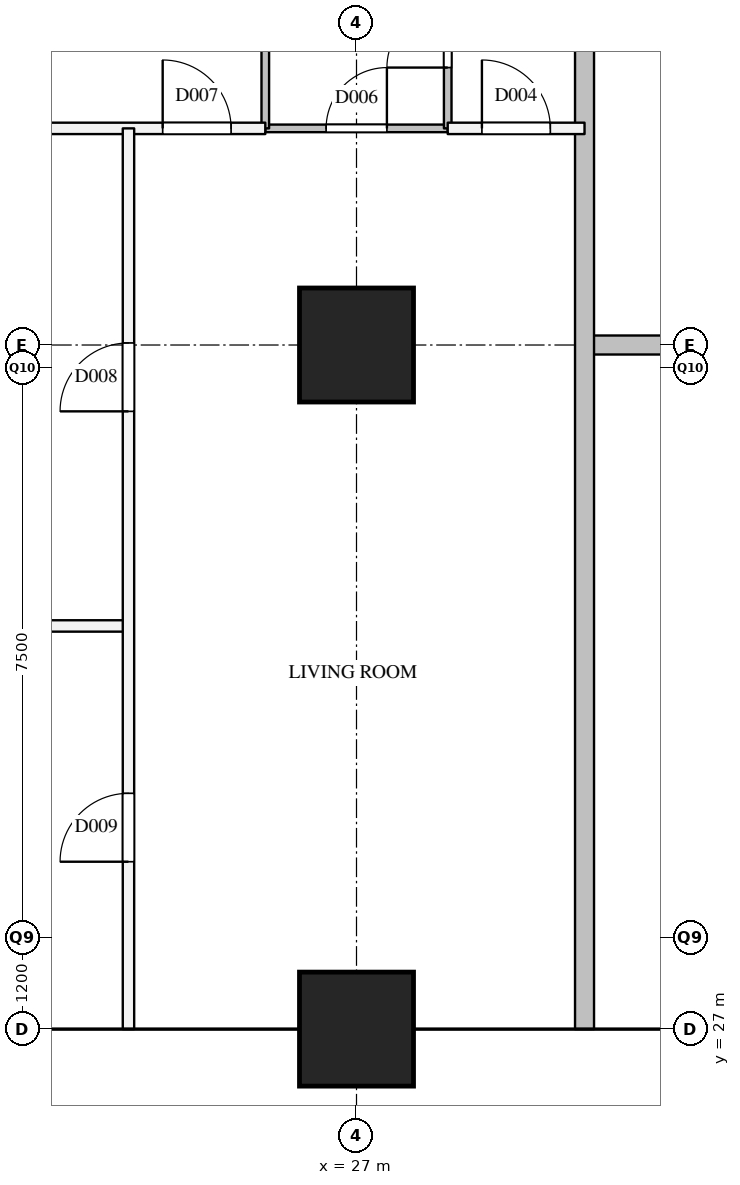
"""IFC4 building model, lengths in metres.
Left out: names, types, materials, properties, quantities, classifications, styles, units other than length and angle.
Written with IfcOpenShell. Run it as: python <this file> out.ifc"""

import sys

from ifc_helpers import new_model, si_unit, direction, frame, frame_2d, origin, origin_2d, place, context, subcontext, project, spatial, rectangle, extrude, element, fill, save


model = new_model("IFC4")
c1 = context("Model", 3, precision=1e-05, world=origin(), true_north=direction((0.0, 1.0)))
c2 = subcontext(c1, "Body", "Model", "MODEL_VIEW")
j1 = project(units=[si_unit("LENGTHUNIT", "METRE"), si_unit("PLANEANGLEUNIT", "RADIAN")], contexts=[c1])
p1 = place(None, origin())
s1 = spatial("IfcSite", under=j1, at=p1, CompositionType="ELEMENT")
p2 = place(p1, origin())
s2 = spatial("IfcBuilding", under=s1, at=p2, CompositionType="ELEMENT")
p3 = place(p2, frame((0.0, 0.0, 150.5)))
s3 = spatial("IfcBuildingStorey", under=s2, at=p3, CompositionType="ELEMENT", Elevation=150.5)
for number, where, z_axis, x_axis in (
    (1, (27.0, 27.0, 0.0), (0.0, 0.0, 1.0), (1.0, 0.0, 0.0)),
    (2, (27.0, 36.0, 0.0), (0.0, 0.0, 1.0), (1.0, 0.0, 0.0)),
):
    element("IfcColumn", number, at=place(p3, frame(where, z_axis=z_axis, x_axis=x_axis)), inside=s3, PredefinedType="COLUMN", context=c2, shape_type="SweptSolid", body=[
        extrude(rectangle(XDim=1.5, YDim=1.5, at=origin_2d()), origin(), (0.0, 0.0, 1.0), 3.9),
    ])
p4 = place(p3, frame((19.5, 32.304, 0.0), z_axis=(0.0, 0.0, 1.0), x_axis=(1.0, 0.0, 0.0)))
e3 = element("IfcWall", 3, at=p4, inside=s3, PredefinedType="PARTITIONING", context=c2, shape_type="SweptSolid", body=[
    extrude(rectangle(XDim=4.5, YDim=0.15, at=frame_2d((2.25, 0.0))), origin(), (0.0, 0.0, 1.0), 3.6),
])
p5 = place(p3, frame((19.5, 38.85, 0.0), z_axis=(0.0, 0.0, 1.0), x_axis=(1.0, 0.0, 0.0)))
e4 = element("IfcWall", 4, at=p5, inside=s3, PredefinedType="PARTITIONING", context=c2, shape_type="SweptSolid", body=[
    extrude(rectangle(XDim=6.3, YDim=0.15, at=frame_2d((3.15, 0.0))), origin(), (0.0, 0.0, 1.0), 3.6),
])
p6 = place(p5, frame((4.95, 0.0, 0.0)))
e5 = element("IfcOpeningElement", 5, at=p6, cuts=e4, PredefinedType="OPENING", context=c2, shape_type="SweptSolid", body=[
    extrude(rectangle(XDim=0.9, YDim=2.1, at=frame_2d((0.45, 1.05))), frame((0.0, 0.085, 0.0), z_axis=(0.0, -1.0, 0.0), x_axis=(1.0, 0.0, 0.0)), (0.0, 0.0, 1.0), 0.17),
])
p7 = place(p3, frame((28.2, 38.85, 0.0), z_axis=(0.0, 0.0, 1.0), x_axis=(1.0, 0.0, 0.0)))
e6 = element("IfcWall", 6, at=p7, inside=s3, PredefinedType="PARTITIONING", context=c2, shape_type="SweptSolid", body=[
    extrude(rectangle(XDim=1.8, YDim=0.15, at=frame_2d((0.9, 0.0))), origin(), (0.0, 0.0, 1.0), 3.6),
])
p8 = place(p7, frame((0.45, 0.0, 0.0)))
e7 = element("IfcOpeningElement", 7, at=p8, cuts=e6, PredefinedType="OPENING", context=c2, shape_type="SweptSolid", body=[
    extrude(rectangle(XDim=0.9, YDim=2.1, at=frame_2d((0.45, 1.05))), frame((0.0, 0.085, 0.0), z_axis=(0.0, -1.0, 0.0), x_axis=(1.0, 0.0, 0.0)), (0.0, 0.0, 1.0), 0.17),
])
p9 = place(p3, frame((24.0, 27.0, 0.0), z_axis=(0.0, 0.0, 1.0), x_axis=(0.0, 1.0, 0.0)))
e8 = element("IfcWall", 8, at=p9, inside=s3, PredefinedType="PARTITIONING", context=c2, shape_type="SweptSolid", body=[
    extrude(rectangle(XDim=11.85, YDim=0.15, at=frame_2d((5.925, 0.0))), origin(), (0.0, 0.0, 1.0), 2.6),
])
p10 = place(p9, frame((8.127, 0.0, 0.0)))
e9 = element("IfcOpeningElement", 9, at=p10, cuts=e8, PredefinedType="OPENING", context=c2, shape_type="SweptSolid", body=[
    extrude(rectangle(XDim=0.9, YDim=2.1, at=frame_2d((0.45, 1.05))), frame((0.0, 0.085, 0.0), z_axis=(0.0, -1.0, 0.0), x_axis=(1.0, 0.0, 0.0)), (0.0, 0.0, 1.0), 0.17),
])
p11 = place(p9, frame((2.202, 0.0, 0.0)))
e10 = element("IfcOpeningElement", 10, at=p11, cuts=e8, PredefinedType="OPENING", context=c2, shape_type="SweptSolid", body=[
    extrude(rectangle(XDim=0.9, YDim=2.1, at=frame_2d((0.45, 1.05))), frame((0.0, 0.085, 0.0), z_axis=(0.0, -1.0, 0.0), x_axis=(1.0, 0.0, 0.0)), (0.0, 0.0, 1.0), 0.17),
])
p12 = place(p3, frame((30.0, 36.0, 0.0), z_axis=(0.0, 0.0, 1.0), x_axis=(1.0, 0.0, 0.0)))
e11 = element("IfcWall", 11, at=p12, inside=s3, PredefinedType="PARTITIONING", context=c2, shape_type="SweptSolid", body=[
    extrude(rectangle(XDim=4.5, YDim=0.25, at=frame_2d((2.25, 0.0))), origin(), (0.0, 0.0, 1.0), 3.6),
])
p13 = place(p3, frame((30.0, 27.0, 0.0), z_axis=(0.0, 0.0, 1.0), x_axis=(0.0, 1.0, 0.0)))
e12 = element("IfcWall", 12, at=p13, inside=s3, PredefinedType="PARTITIONING", context=c2, shape_type="SweptSolid", body=[
    extrude(rectangle(XDim=14.25, YDim=0.25, at=frame_2d((7.125, 0.0))), origin(), (0.0, 0.0, 1.0), 2.6),
])
p14 = place(p3, frame((25.8, 38.85, 0.0), z_axis=(0.0, 0.0, 1.0), x_axis=(1.0, 0.0, 0.0)))
e13 = element("IfcWall", 13, at=p14, inside=s3, PredefinedType="PARTITIONING", context=c2, shape_type="SweptSolid", body=[
    extrude(rectangle(XDim=2.4, YDim=0.1, at=frame_2d((1.2, 0.0))), origin(), (0.0, 0.0, 1.0), 2.6),
])
p15 = place(p14, frame((0.8, 0.0, 0.0)))
e14 = element("IfcOpeningElement", 14, at=p15, cuts=e13, PredefinedType="OPENING", context=c2, shape_type="SweptSolid", body=[
    extrude(rectangle(XDim=0.8, YDim=2.1, at=frame_2d((0.4, 1.05))), frame((0.0, 0.06, 0.0), z_axis=(0.0, -1.0, 0.0), x_axis=(1.0, 0.0, 0.0)), (0.0, 0.0, 1.0), 0.12),
])
p16 = place(p3, frame((25.8, 38.85, 0.0), z_axis=(0.0, 0.0, 1.0), x_axis=(0.0, 1.0, 0.0)))
e15 = element("IfcWall", 15, at=p16, inside=s3, PredefinedType="PARTITIONING", context=c2, shape_type="SweptSolid", body=[
    extrude(rectangle(XDim=2.4, YDim=0.1, at=frame_2d((1.2, 0.0))), origin(), (0.0, 0.0, 1.0), 3.6),
])
p17 = place(p3, frame((28.2, 38.85, 0.0), z_axis=(0.0, 0.0, 1.0), x_axis=(0.0, 1.0, 0.0)))
e16 = element("IfcWall", 16, at=p17, inside=s3, PredefinedType="PARTITIONING", context=c2, shape_type="SweptSolid", body=[
    extrude(rectangle(XDim=2.4, YDim=0.1, at=frame_2d((1.2, 0.0))), origin(), (0.0, 0.0, 1.0), 3.6),
])
p18 = place(p17, frame((0.8, 0.0, 0.0)))
e17 = element("IfcOpeningElement", 17, at=p18, cuts=e16, PredefinedType="OPENING", context=c2, shape_type="SweptSolid", body=[
    extrude(rectangle(XDim=0.8, YDim=2.1, at=frame_2d((0.4, 1.05))), frame((0.0, 0.06, 0.0), z_axis=(0.0, -1.0, 0.0), x_axis=(1.0, 0.0, 0.0)), (0.0, 0.0, 1.0), 0.12),
])
p19 = place(p8, origin())
e18 = element("IfcDoor", 18, at=p19, inside=s3, OperationType="SINGLE_SWING_LEFT", PredefinedType="DOOR", context=c2, shape_type="SweptSolid", body=[
    extrude(rectangle(XDim=0.9, YDim=2.1, at=frame_2d((0.45, 1.05))), frame((0.0, 0.025, 0.0), z_axis=(0.0, -1.0, 0.0), x_axis=(1.0, 0.0, 0.0)), (0.0, 0.0, 1.0), 0.05),
])
fill(e7, e18)
p20 = place(p18, origin())
e19 = element("IfcDoor", 19, at=p20, inside=s3, OperationType="SINGLE_SWING_LEFT", PredefinedType="DOOR", context=c2, shape_type="SweptSolid", body=[
    extrude(rectangle(XDim=0.8, YDim=2.1, at=frame_2d((0.4, 1.05))), frame((0.0, 0.025, 0.0), z_axis=(0.0, -1.0, 0.0), x_axis=(1.0, 0.0, 0.0)), (0.0, 0.0, 1.0), 0.05),
])
fill(e17, e19)
p21 = place(p15, origin())
e20 = element("IfcDoor", 20, at=p21, inside=s3, OperationType="SINGLE_SWING_RIGHT", PredefinedType="DOOR", context=c2, shape_type="SweptSolid", body=[
    extrude(rectangle(XDim=0.8, YDim=2.1, at=frame_2d((0.4, 1.05))), frame((0.0, 0.025, 0.0), z_axis=(0.0, -1.0, 0.0), x_axis=(1.0, 0.0, 0.0)), (0.0, 0.0, 1.0), 0.05),
])
fill(e14, e20)
p22 = place(p6, origin())
e21 = element("IfcDoor", 21, at=p22, inside=s3, OperationType="SINGLE_SWING_LEFT", PredefinedType="DOOR", context=c2, shape_type="SweptSolid", body=[
    extrude(rectangle(XDim=0.9, YDim=2.1, at=frame_2d((0.45, 1.05))), frame((0.0, 0.025, 0.0), z_axis=(0.0, -1.0, 0.0), x_axis=(1.0, 0.0, 0.0)), (0.0, 0.0, 1.0), 0.05),
])
fill(e5, e21)
p23 = place(p10, origin())
e22 = element("IfcDoor", 22, at=p23, inside=s3, OperationType="SINGLE_SWING_LEFT", PredefinedType="DOOR", context=c2, shape_type="SweptSolid", body=[
    extrude(rectangle(XDim=0.9, YDim=2.1, at=frame_2d((0.45, 1.05))), frame((0.0, 0.025, 0.0), z_axis=(0.0, -1.0, 0.0), x_axis=(1.0, 0.0, 0.0)), (0.0, 0.0, 1.0), 0.05),
])
fill(e9, e22)
p24 = place(p11, origin())
e23 = element("IfcDoor", 23, at=p24, inside=s3, OperationType="SINGLE_SWING_LEFT", PredefinedType="DOOR", context=c2, shape_type="SweptSolid", body=[
    extrude(rectangle(XDim=0.9, YDim=2.1, at=frame_2d((0.45, 1.05))), frame((0.0, 0.025, 0.0), z_axis=(0.0, -1.0, 0.0), x_axis=(1.0, 0.0, 0.0)), (0.0, 0.0, 1.0), 0.05),
])
fill(e10, e23)
save(model, sys.argv[1])
